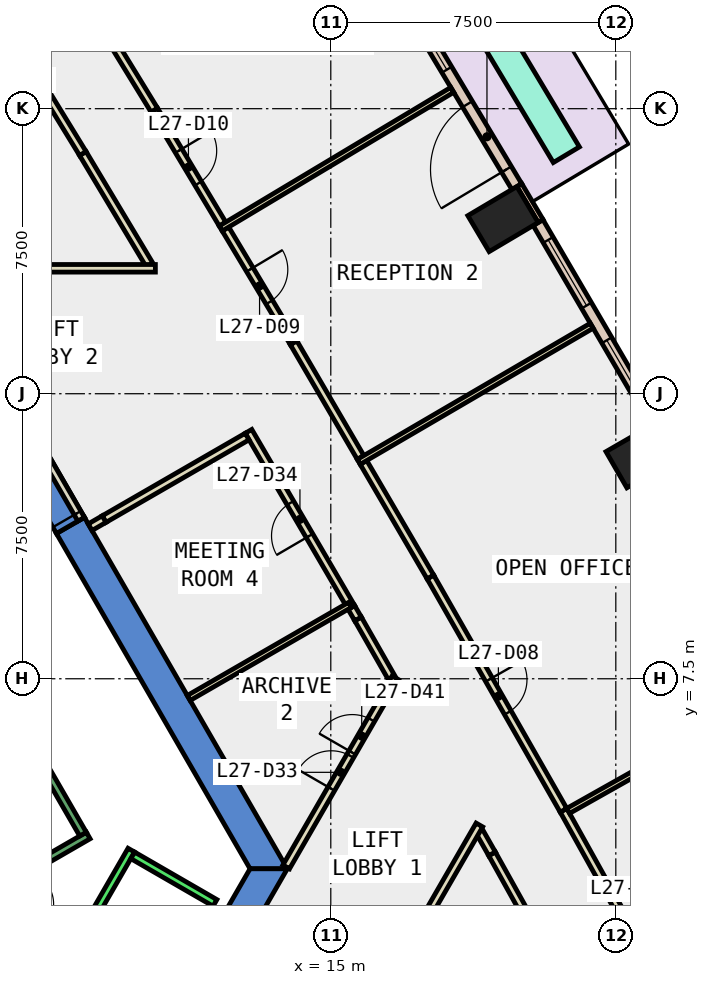
"""IFC4 building model, lengths in metres.
Left out: names, types, materials, properties, quantities, classifications, styles, units other than length and angle.
Written with IfcOpenShell. Run it as: python <this file> out.ifc"""

import sys

from ifc_helpers import new_model, si_unit, direction, frame, frame_2d, origin, origin_2d, place, context, subcontext, project, spatial, polyline, rectangle, outline, extrude, element, fill, save


model = new_model("IFC4")
c1 = context("Model", 3, precision=1e-05, world=origin(), true_north=direction((0.0, 1.0)))
c2 = subcontext(c1, "Body", "Model", "MODEL_VIEW")
j1 = project(units=[si_unit("LENGTHUNIT", "METRE"), si_unit("PLANEANGLEUNIT", "RADIAN")], contexts=[c1])
p1 = place(None, origin())
s1 = spatial("IfcSite", under=j1, at=p1, CompositionType="ELEMENT")
p2 = place(p1, origin())
s2 = spatial("IfcBuilding", under=s1, at=p2, CompositionType="ELEMENT")
p3 = place(p2, frame((0.0, 0.0, 124.4)))
s3 = spatial("IfcBuildingStorey", under=s2, at=p3, CompositionType="ELEMENT", Elevation=124.4)
for number, where, z_axis, x_axis in (
    (1, (23.166, 13.375, -0.4), (0.0, 0.0, 1.0), (-0.5, 0.866, 0.0)),
    (2, (19.532, 19.595, -0.4), (0.0, 0.0, 1.0), (-0.51, 0.86, 0.0)),
):
    element("IfcColumn", number, at=place(p3, frame(where, z_axis=z_axis, x_axis=x_axis)), inside=s3, PredefinedType="COLUMN", context=c2, shape_type="SweptSolid", body=[
        extrude(rectangle(XDim=1.1, YDim=1.5, at=origin_2d()), origin(), (0.0, 0.0, 1.0), 4.2),
    ])
p4 = place(p3, frame((0.0, 0.0, -0.4)))
e3 = element("IfcWall", 3, at=p4, inside=s3, PredefinedType="SHEAR", context=c2, shape_type="SweptSolid", body=[
    extrude(outline(polyline([(8.517, 11.748), (7.781, 11.323), (12.875, 2.5), (13.856, 2.5), (8.517, 11.748)])), origin(), (0.0, 0.0, 1.0), 4.2),
])
p5 = place(p3, frame((0.0, 0.0, 3.6)))
e4 = element("IfcWall", 4, at=p5, inside=s3, PredefinedType="SHEAR", context=c2, shape_type="SweptSolid", body=[
    extrude(outline(polyline([(7.517, 13.48), (6.781, 13.055), (7.781, 11.323), (8.517, 11.748), (7.517, 13.48)])), origin(), (0.0, 0.0, 1.0), 0.2),
])
p6 = place(p3, frame((0.0, 0.0, -0.4)))
e5 = element("IfcWall", 5, at=p6, inside=s3, PredefinedType="SHEAR", context=c2, shape_type="SweptSolid", body=[
    extrude(outline(polyline([(11.931, 0.865), (12.667, 0.44), (13.856, 2.5), (12.875, 2.5), (11.931, 0.865)])), origin(), (0.0, 0.0, 1.0), 4.2),
])
p7 = place(p3, frame((20.522, 19.543, 0.0), z_axis=(0.0, 0.0, 1.0), x_axis=(-0.510082245696, 0.860125631885, 0.0)))
e6 = element("IfcWall", 6, at=p7, inside=s3, PredefinedType="STANDARD", context=c2, shape_type="SweptSolid", body=[
    extrude(rectangle(XDim=1.1, YDim=0.15, at=frame_2d((0.55, 0.0))), origin(), (0.0, 0.0, 1.0), 3.8),
])
p8 = place(p3, frame((23.538, 14.224, 0.0), z_axis=(0.0, 0.0, 1.0), x_axis=(-0.504441987427, 0.863445586775, 0.0)))
e7 = element("IfcWall", 7, at=p8, inside=s3, PredefinedType="STANDARD", context=c2, shape_type="SweptSolid", body=[
    extrude(rectangle(XDim=6.114, YDim=0.3, at=frame_2d((3.057, 0.0))), origin(), (0.0, 0.0, 1.0), 3.8),
])
p9 = place(p8, frame((0.528, 0.0, 0.9)))
e8 = element("IfcOpeningElement", 8, at=p9, cuts=e7, PredefinedType="OPENING", context=c2, shape_type="SweptSolid", body=[
    extrude(rectangle(XDim=2.0, YDim=2.6, at=frame_2d((1.0, 1.3))), frame((0.0, 0.16, 0.0), z_axis=(0.0, -1.0, 0.0), x_axis=(1.0, 0.0, 0.0)), (0.0, 0.0, 1.0), 0.32),
])
p10 = place(p8, frame((3.585, 0.0, 0.9)))
e9 = element("IfcOpeningElement", 9, at=p10, cuts=e7, PredefinedType="OPENING", context=c2, shape_type="SweptSolid", body=[
    extrude(rectangle(XDim=2.0, YDim=2.6, at=frame_2d((1.0, 1.3))), frame((0.0, 0.16, 0.0), z_axis=(0.0, -1.0, 0.0), x_axis=(1.0, 0.0, 0.0)), (0.0, 0.0, 1.0), 0.32),
])
p11 = place(p3, frame((19.895, 20.449, 0.0), z_axis=(0.0, 0.0, 1.0), x_axis=(-0.513708729904, 0.857964650099, 0.0)))
e10 = element("IfcWall", 10, at=p11, inside=s3, PredefinedType="STANDARD", context=c2, shape_type="SweptSolid", body=[
    extrude(rectangle(XDim=6.115, YDim=0.3, at=frame_2d((3.057, 0.0))), origin(), (0.0, 0.0, 1.0), 3.8),
])
p12 = place(p11, frame((0.529, 0.0, 0.0)))
e11 = element("IfcOpeningElement", 11, at=p12, cuts=e10, PredefinedType="OPENING", context=c2, shape_type="SweptSolid", body=[
    extrude(rectangle(XDim=2.0, YDim=2.4, at=frame_2d((1.0, 1.2))), frame((0.0, 0.16, 0.0), z_axis=(0.0, -1.0, 0.0), x_axis=(1.0, 0.0, 0.0)), (0.0, 0.0, 1.0), 0.32),
])
p13 = place(p11, frame((3.586, 0.0, 0.9)))
e12 = element("IfcOpeningElement", 12, at=p13, cuts=e10, PredefinedType="OPENING", context=c2, shape_type="SweptSolid", body=[
    extrude(rectangle(XDim=2.0, YDim=2.6, at=frame_2d((1.0, 1.3))), frame((0.0, 0.16, 0.0), z_axis=(0.0, -1.0, 0.0), x_axis=(1.0, 0.0, 0.0)), (0.0, 0.0, 1.0), 0.32),
])
p14 = place(p3, frame((21.199, 21.288, 0.0), z_axis=(0.0, 0.0, 1.0), x_axis=(-0.513779237715, 0.857922429415, 0.0)))
e13 = element("IfcWall", 13, at=p14, inside=s3, PredefinedType="STANDARD", context=c2, shape_type="SweptSolid", body=[
    extrude(rectangle(XDim=6.014, YDim=0.8, at=frame_2d((3.007, 0.0))), origin(), (0.0, 0.0, 1.0), 0.8),
])
p15 = place(p3, frame((16.601, 7.526, 0.0), z_axis=(0.0, 0.0, 1.0), x_axis=(-0.495652400286, 0.868520983103, 0.0)))
e14 = element("IfcWall", 14, at=p15, inside=s3, PredefinedType="PARTITIONING", context=c2, shape_type="SweptSolid", body=[
    extrude(rectangle(XDim=1.784, YDim=0.2, at=frame_2d((0.892, 0.0))), origin(), (0.0, 0.0, 1.0), 3.8),
])
p16 = place(p3, frame((15.717, 9.075, 0.0), z_axis=(0.0, 0.0, 1.0), x_axis=(-0.50235401398, 0.864662040706, 0.0)))
e15 = element("IfcWall", 15, at=p16, inside=s3, PredefinedType="PARTITIONING", context=c2, shape_type="SweptSolid", body=[
    extrude(rectangle(XDim=0.35, YDim=0.2, at=frame_2d((0.175, 0.0))), origin(), (0.0, 0.0, 1.0), 3.8),
])
p17 = place(p3, frame((15.541, 9.378, 0.0), z_axis=(0.0, 0.0, 1.0), x_axis=(-0.504428354193, 0.863453551435, 0.0)))
e16 = element("IfcWall", 16, at=p17, inside=s3, PredefinedType="PARTITIONING", context=c2, shape_type="SweptSolid", body=[
    extrude(rectangle(XDim=5.365, YDim=0.2, at=frame_2d((2.682, 0.0))), origin(), (0.0, 0.0, 1.0), 3.8),
])
p18 = place(p17, frame((2.182, 0.0, 0.0)))
e17 = element("IfcOpeningElement", 17, at=p18, cuts=e16, PredefinedType="OPENING", context=c2, shape_type="SweptSolid", body=[
    extrude(rectangle(XDim=1.0, YDim=2.1, at=frame_2d((0.5, 1.05))), frame((0.0, 0.11, 0.0), z_axis=(0.0, -1.0, 0.0), x_axis=(1.0, 0.0, 0.0)), (0.0, 0.0, 1.0), 0.22),
])
p19 = place(p3, frame((12.798, 13.873, 0.0), z_axis=(0.0, 0.0, 1.0), x_axis=(-0.866080799279, -0.499904039911, 0.0)))
e18 = element("IfcWall", 18, at=p19, inside=s3, PredefinedType="PARTITIONING", context=c2, shape_type="SweptSolid", body=[
    extrude(rectangle(XDim=4.345, YDim=0.2, at=frame_2d((2.172, 0.0))), origin(), (0.0, 0.0, 1.0), 3.8),
])
p20 = place(p3, frame((10.232, 18.386, 0.0), z_axis=(0.0, 0.0, 1.0), x_axis=(-0.513592824646, 0.858034038062, 0.0)))
e19 = element("IfcWall", 19, at=p20, inside=s3, PredefinedType="PARTITIONING", context=c2, shape_type="SweptSolid", body=[
    extrude(rectangle(XDim=3.421, YDim=0.2, at=frame_2d((1.71, 0.0))), origin(), (0.0, 0.0, 1.0), 3.8),
])
p21 = place(p3, frame((8.475, 21.321, 0.0), z_axis=(0.0, 0.0, 1.0), x_axis=(-0.522743103274, 0.852490262689, 0.0)))
e20 = element("IfcWall", 20, at=p21, inside=s3, PredefinedType="PARTITIONING", context=c2, shape_type="SweptSolid", body=[
    extrude(rectangle(XDim=7.115, YDim=0.2, at=frame_2d((3.557, 0.0))), origin(), (0.0, 0.0, 1.0), 3.8),
])
p22 = place(p21, frame((3.057, 0.0, 0.0)))
e21 = element("IfcOpeningElement", 21, at=p22, cuts=e20, PredefinedType="OPENING", context=c2, shape_type="SweptSolid", body=[
    extrude(rectangle(XDim=1.0, YDim=2.1, at=frame_2d((0.5, 1.05))), frame((0.0, 0.11, 0.0), z_axis=(0.0, -1.0, 0.0), x_axis=(1.0, 0.0, 0.0)), (0.0, 0.0, 1.0), 0.22),
])
p23 = place(p3, frame((22.702, -3.321, 0.0), z_axis=(0.0, 0.0, 1.0), x_axis=(-0.486304341235, 0.873789498504, 0.0)))
e22 = element("IfcWall", 22, at=p23, inside=s3, PredefinedType="PARTITIONING", context=c2, shape_type="SweptSolid", body=[
    extrude(rectangle(XDim=7.113, YDim=0.2, at=frame_2d((3.556, 0.0))), origin(), (0.0, 0.0, 1.0), 3.8),
])
p24 = place(p23, frame((3.057, 0.0, 0.0)))
e23 = element("IfcOpeningElement", 23, at=p24, cuts=e22, PredefinedType="OPENING", context=c2, shape_type="SweptSolid", body=[
    extrude(rectangle(XDim=1.0, YDim=2.1, at=frame_2d((0.5, 1.05))), frame((0.0, 0.11, 0.0), z_axis=(0.0, -1.0, 0.0), x_axis=(1.0, 0.0, 0.0)), (0.0, 0.0, 1.0), 0.22),
])
p25 = place(p3, frame((19.243, 2.894, 0.0), z_axis=(0.0, 0.0, 1.0), x_axis=(-0.494108984218, 0.869399972231, 0.0)))
e24 = element("IfcWall", 24, at=p25, inside=s3, PredefinedType="PARTITIONING", context=c2, shape_type="SweptSolid", body=[
    extrude(rectangle(XDim=0.674, YDim=0.2, at=frame_2d((0.337, 0.0))), origin(), (0.0, 0.0, 1.0), 3.8),
])
p26 = place(p3, frame((21.124, 4.04, 0.0), z_axis=(0.0, 0.0, 1.0), x_axis=(0.486229558972, -0.873831114107, 0.0)))
e25 = element("IfcWall", 25, at=p26, inside=s3, PredefinedType="PARTITIONING", context=c2, shape_type="SweptSolid", body=[
    extrude(rectangle(XDim=7.136, YDim=0.2, at=frame_2d((3.568, 0.0))), origin(), (0.0, 0.0, 1.0), 3.8),
])
p27 = place(p26, frame((3.143, 0.0, 0.0)))
e26 = element("IfcOpeningElement", 26, at=p27, cuts=e25, PredefinedType="OPENING", context=c2, shape_type="SweptSolid", body=[
    extrude(rectangle(XDim=1.0, YDim=2.1, at=frame_2d((0.5, 1.05))), frame((0.0, 0.11, 0.0), z_axis=(0.0, -1.0, 0.0), x_axis=(1.0, 0.0, 0.0)), (0.0, 0.0, 1.0), 0.22),
])
p28 = place(p3, frame((15.86, 13.193, 0.0), z_axis=(0.0, 0.0, 1.0), x_axis=(0.504383407959, -0.863479807393, 0.0)))
e27 = element("IfcWall", 27, at=p28, inside=s3, PredefinedType="PARTITIONING", context=c2, shape_type="SweptSolid", body=[
    extrude(rectangle(XDim=3.495, YDim=0.2, at=frame_2d((1.748, 0.0))), origin(), (0.0, 0.0, 1.0), 3.8),
])
p29 = place(p3, frame((17.623, 10.175, 0.0), z_axis=(0.0, 0.0, 1.0), x_axis=(0.4954688358, -0.868625714995, 0.0)))
e28 = element("IfcWall", 28, at=p29, inside=s3, PredefinedType="PARTITIONING", context=c2, shape_type="SweptSolid", body=[
    extrude(rectangle(XDim=7.064, YDim=0.2, at=frame_2d((3.532, 0.0))), origin(), (0.0, 0.0, 1.0), 3.8),
])
p30 = place(p29, frame((3.107, 0.0, 0.0)))
e29 = element("IfcOpeningElement", 29, at=p30, cuts=e28, PredefinedType="OPENING", context=c2, shape_type="SweptSolid", body=[
    extrude(rectangle(XDim=1.0, YDim=2.1, at=frame_2d((0.5, 1.05))), frame((0.0, 0.11, 0.0), z_axis=(0.0, -1.0, 0.0), x_axis=(1.0, 0.0, 0.0)), (0.0, 0.0, 1.0), 0.22),
])
p31 = place(p3, frame((12.228, 19.335, 0.0), z_axis=(0.0, 0.0, 1.0), x_axis=(0.513796731551, -0.857911952736, 0.0)))
e30 = element("IfcWall", 30, at=p31, inside=s3, PredefinedType="PARTITIONING", context=c2, shape_type="SweptSolid", body=[
    extrude(rectangle(XDim=3.493, YDim=0.2, at=frame_2d((1.747, 0.0))), origin(), (0.0, 0.0, 1.0), 3.8),
])
p32 = place(p31, frame((1.247, 0.0, 0.0)))
e31 = element("IfcOpeningElement", 31, at=p32, cuts=e30, PredefinedType="OPENING", context=c2, shape_type="SweptSolid", body=[
    extrude(rectangle(XDim=1.0, YDim=2.1, at=frame_2d((0.5, 1.05))), frame((0.0, 0.11, 0.0), z_axis=(0.0, -1.0, 0.0), x_axis=(1.0, 0.0, 0.0)), (0.0, 0.0, 1.0), 0.22),
])
p33 = place(p3, frame((14.023, 16.338, 0.0), z_axis=(0.0, 0.0, 1.0), x_axis=(0.50424043703, -0.863563304954, 0.0)))
e32 = element("IfcWall", 32, at=p33, inside=s3, PredefinedType="PARTITIONING", context=c2, shape_type="SweptSolid", body=[
    extrude(rectangle(XDim=3.492, YDim=0.2, at=frame_2d((1.746, 0.0))), origin(), (0.0, 0.0, 1.0), 3.8),
])
p34 = place(p3, frame((8.531, 25.439, 0.0), z_axis=(0.0, 0.0, 1.0), x_axis=(0.522704631836, -0.852513852003, 0.0)))
e33 = element("IfcWall", 33, at=p34, inside=s3, PredefinedType="PARTITIONING", context=c2, shape_type="SweptSolid", body=[
    extrude(rectangle(XDim=3.493, YDim=0.2, at=frame_2d((1.747, 0.0))), origin(), (0.0, 0.0, 1.0), 3.8),
])
p35 = place(p3, frame((10.357, 22.461, 0.0), z_axis=(0.0, 0.0, 1.0), x_axis=(0.513467759888, -0.858108885606, 0.0)))
e34 = element("IfcWall", 34, at=p35, inside=s3, PredefinedType="PARTITIONING", context=c2, shape_type="SweptSolid", body=[
    extrude(rectangle(XDim=3.494, YDim=0.2, at=frame_2d((1.747, 0.0))), origin(), (0.0, 0.0, 1.0), 3.8),
])
p36 = place(p35, frame((1.247, 0.0, 0.0)))
e35 = element("IfcOpeningElement", 35, at=p36, cuts=e34, PredefinedType="OPENING", context=c2, shape_type="SweptSolid", body=[
    extrude(rectangle(XDim=1.0, YDim=2.1, at=frame_2d((0.5, 1.05))), frame((0.0, 0.11, 0.0), z_axis=(0.0, -1.0, 0.0), x_axis=(1.0, 0.0, 0.0)), (0.0, 0.0, 1.0), 0.22),
])
p37 = place(p3, frame((6.25, 1.894, 0.0), z_axis=(0.0, 0.0, 1.0), x_axis=(0.866043184279, -0.499969202016, 0.0)))
e36 = element("IfcWall", 36, at=p37, inside=s3, PredefinedType="PARTITIONING", context=c2, shape_type="SweptSolid", body=[
    extrude(rectangle(XDim=2.084, YDim=0.2, at=frame_2d((1.042, 0.0))), origin(), (0.0, 0.0, 1.0), 3.8),
])
p38 = place(p37, frame((0.642, 0.0, 0.0)))
e37 = element("IfcOpeningElement", 37, at=p38, cuts=e36, PredefinedType="OPENING", context=c2, shape_type="SweptSolid", body=[
    extrude(rectangle(XDim=0.9, YDim=2.1, at=frame_2d((0.45, 1.05))), frame((0.0, 0.11, 0.0), z_axis=(0.0, -1.0, 0.0), x_axis=(1.0, 0.0, 0.0)), (0.0, 0.0, 1.0), 0.22),
])
p39 = place(p3, frame((11.261, 6.994, 0.0), z_axis=(0.0, 0.0, 1.0), x_axis=(0.866013769041, 0.500020151426, 0.0)))
e38 = element("IfcWall", 38, at=p39, inside=s3, PredefinedType="PARTITIONING", context=c2, shape_type="SweptSolid", body=[
    extrude(rectangle(XDim=4.898, YDim=0.15, at=frame_2d((2.449, 0.0))), origin(), (0.0, 0.0, 1.0), 3.8),
])
p40 = place(p3, frame((13.827, 2.55, 0.0), z_axis=(0.0, 0.0, 1.0), x_axis=(0.500032637853, 0.866006559491, 0.0)))
e39 = element("IfcWall", 39, at=p40, inside=s3, PredefinedType="PARTITIONING", context=c2, shape_type="SweptSolid", body=[
    extrude(rectangle(XDim=5.746, YDim=0.2, at=frame_2d((2.873, 0.0))), origin(), (0.0, 0.0, 1.0), 3.8),
])
p41 = place(p40, frame((2.373, 0.0, 0.0)))
e40 = element("IfcOpeningElement", 40, at=p41, cuts=e39, PredefinedType="OPENING", context=c2, shape_type="SweptSolid", body=[
    extrude(rectangle(XDim=1.0, YDim=2.1, at=frame_2d((0.5, 1.05))), frame((0.0, 0.11, 0.0), z_axis=(0.0, -1.0, 0.0), x_axis=(1.0, 0.0, 0.0)), (0.0, 0.0, 1.0), 0.22),
])
p42 = place(p40, frame((3.473, 0.0, 0.0)))
e41 = element("IfcOpeningElement", 41, at=p42, cuts=e39, PredefinedType="OPENING", context=c2, shape_type="SweptSolid", body=[
    extrude(rectangle(XDim=1.0, YDim=2.1, at=frame_2d((0.5, 1.05))), frame((0.0, 0.11, 0.0), z_axis=(0.0, -1.0, 0.0), x_axis=(1.0, 0.0, 0.0)), (0.0, 0.0, 1.0), 0.22),
])
p43 = place(p3, frame((0.4, 18.3, 0.0), z_axis=(0.0, 0.0, 1.0), x_axis=(1.0, 0.0, 0.0)))
e42 = element("IfcWall", 42, at=p43, inside=s3, PredefinedType="PARTITIONING", context=c2, shape_type="SweptSolid", body=[
    extrude(rectangle(XDim=9.984, YDim=0.2, at=frame_2d((4.992, 0.0))), origin(), (0.0, 0.0, 1.0), 3.8),
])
p44 = place(p3, frame((18.91, 3.653, 0.0), z_axis=(0.0, 0.0, 1.0), x_axis=(-0.500052967229, -0.865994820981, 0.0)))
e43 = element("IfcWall", 43, at=p44, inside=s3, PredefinedType="PARTITIONING", context=c2, shape_type="SweptSolid", body=[
    extrude(rectangle(XDim=5.179, YDim=0.2, at=frame_2d((2.59, 0.0))), origin(), (0.0, 0.0, 1.0), 3.8),
])
p45 = place(p3, frame((21.247, 4.024, 0.0), z_axis=(0.0, 0.0, 1.0), x_axis=(0.871261721438, 0.490818716795, 0.0)))
e44 = element("IfcWall", 44, at=p45, inside=s3, PredefinedType="PARTITIONING", context=c2, shape_type="SweptSolid", body=[
    extrude(rectangle(XDim=5.53, YDim=0.15, at=frame_2d((2.765, 0.0))), origin(), (0.0, 0.0, 1.0), 3.8),
])
p46 = place(p3, frame((15.736, 13.207, 0.0), z_axis=(0.0, 0.0, 1.0), x_axis=(0.863454426155, 0.504426856892, 0.0)))
e45 = element("IfcWall", 45, at=p46, inside=s3, PredefinedType="PARTITIONING", context=c2, shape_type="SweptSolid", body=[
    extrude(rectangle(XDim=7.099, YDim=0.15, at=frame_2d((3.55, 0.0))), origin(), (0.0, 0.0, 1.0), 3.8),
])
p47 = place(p3, frame((12.104, 19.348, 0.0), z_axis=(0.0, 0.0, 1.0), x_axis=(0.85799008499, 0.513666247732, 0.0)))
e46 = element("IfcWall", 46, at=p47, inside=s3, PredefinedType="PARTITIONING", context=c2, shape_type="SweptSolid", body=[
    extrude(rectangle(XDim=7.1, YDim=0.15, at=frame_2d((3.55, 0.0))), origin(), (0.0, 0.0, 1.0), 3.8),
])
p48 = place(p3, frame((8.43, 11.698, 0.0), z_axis=(0.0, 0.0, 1.0), x_axis=(-0.50002537861, 0.866010750942, 0.0)))
e47 = element("IfcWall", 47, at=p48, inside=s3, PredefinedType="PARTITIONING", context=c2, shape_type="SweptSolid", body=[
    extrude(rectangle(XDim=2.0, YDim=0.2, at=frame_2d((1.0, 0.0))), origin(), (0.0, 0.0, 1.0), 2.4),
])
p49 = place(p48, frame((0.19, 0.0, 0.0)))
e48 = element("IfcOpeningElement", 48, at=p49, cuts=e47, PredefinedType="OPENING", context=c2, shape_type="SweptSolid", body=[
    extrude(rectangle(XDim=1.8, YDim=2.1, at=frame_2d((0.9, 1.05))), frame((0.0, 0.11, 0.0), z_axis=(0.0, -1.0, 0.0), x_axis=(1.0, 0.0, 0.0)), (0.0, 0.0, 1.0), 0.22),
])
p50 = place(p3, frame((9.035, 11.701, 0.0), z_axis=(0.0, 0.0, 1.0), x_axis=(-0.865544229481, -0.500832493767, 0.0)))
e49 = element("IfcWall", 49, at=p50, inside=s3, PredefinedType="PARTITIONING", context=c2, shape_type="SweptSolid", body=[
    extrude(rectangle(XDim=0.425, YDim=0.2, at=frame_2d((0.212, 0.0))), origin(), (0.0, 0.0, 1.0), 2.4),
])
p51 = place(p3, frame((4.451, -6.19, 0.0), z_axis=(0.0, 0.0, 1.0), x_axis=(0.50000090737, 0.866024879913, 0.0)))
e50 = element("IfcWall", 50, at=p51, inside=s3, PredefinedType="STANDARD", context=c2, shape_type="SweptSolid", body=[
    extrude(rectangle(XDim=10.6, YDim=0.2, at=frame_2d((5.3, 0.0))), origin(), (0.0, 0.0, 1.0), 3.8),
])
p52 = place(p3, frame((9.788, 2.853, 0.0), z_axis=(0.0, 0.0, 1.0), x_axis=(0.865998541277, -0.500046524342, 0.0)))
e51 = element("IfcWall", 51, at=p52, inside=s3, PredefinedType="STANDARD", context=c2, shape_type="SweptSolid", body=[
    extrude(rectangle(XDim=2.5, YDim=0.2, at=frame_2d((1.25, 0.0))), origin(), (0.0, 0.0, 1.0), 3.8),
])
p53 = place(p3, frame((4.806, 1.176, 0.0), z_axis=(0.0, 0.0, 1.0), x_axis=(0.866059941101, 0.499940174841, 0.0)))
e52 = element("IfcWall", 52, at=p53, inside=s3, PredefinedType="STANDARD", context=c2, shape_type="SweptSolid", body=[
    extrude(rectangle(XDim=4.4, YDim=0.2, at=frame_2d((2.2, 0.0))), origin(), (0.0, 0.0, 1.0), 3.8),
])
p54 = place(p53, frame((1.65, 0.0, 0.0)))
e53 = element("IfcOpeningElement", 53, at=p54, cuts=e52, PredefinedType="OPENING", context=c2, shape_type="SweptSolid", body=[
    extrude(rectangle(XDim=1.1, YDim=2.2, at=frame_2d((0.55, 1.1))), frame((0.0, 0.11, 0.0), z_axis=(0.0, -1.0, 0.0), x_axis=(1.0, 0.0, 0.0)), (0.0, 0.0, 1.0), 0.22),
])
p55 = place(p3, frame((8.48, 3.412, 0.0), z_axis=(0.0, 0.0, 1.0), x_axis=(-0.499978703459, 0.866037698999, 0.0)))
e54 = element("IfcWall", 54, at=p55, inside=s3, PredefinedType="STANDARD", context=c2, shape_type="SweptSolid", body=[
    extrude(rectangle(XDim=6.9, YDim=0.2, at=frame_2d((3.45, 0.0))), origin(), (0.0, 0.0, 1.0), 3.8),
])
p56 = place(p9, origin())
e55 = element("IfcWindow", 55, at=p56, inside=s3, PartitioningType="SINGLE_PANEL", PredefinedType="WINDOW", context=c2, shape_type="SweptSolid", body=[
    extrude(rectangle(XDim=2.0, YDim=2.6, at=frame_2d((1.0, 1.3))), frame((0.0, 0.03, 0.0), z_axis=(0.0, -1.0, 0.0), x_axis=(1.0, 0.0, 0.0)), (0.0, 0.0, 1.0), 0.06),
])
fill(e8, e55)
p57 = place(p10, origin())
e56 = element("IfcWindow", 56, at=p57, inside=s3, PartitioningType="SINGLE_PANEL", PredefinedType="WINDOW", context=c2, shape_type="SweptSolid", body=[
    extrude(rectangle(XDim=2.0, YDim=2.6, at=frame_2d((1.0, 1.3))), frame((0.0, 0.03, 0.0), z_axis=(0.0, -1.0, 0.0), x_axis=(1.0, 0.0, 0.0)), (0.0, 0.0, 1.0), 0.06),
])
fill(e9, e56)
p58 = place(p12, origin())
e57 = element("IfcDoor", 57, at=p58, inside=s3, OperationType="SLIDING_TO_LEFT", PredefinedType="DOOR", context=c2, shape_type="SweptSolid", body=[
    extrude(rectangle(XDim=2.0, YDim=2.4, at=frame_2d((1.0, 1.2))), frame((0.0, 0.025, 0.0), z_axis=(0.0, -1.0, 0.0), x_axis=(1.0, 0.0, 0.0)), (0.0, 0.0, 1.0), 0.05),
])
fill(e11, e57)
p59 = place(p13, origin())
e58 = element("IfcWindow", 58, at=p59, inside=s3, PartitioningType="SINGLE_PANEL", PredefinedType="WINDOW", context=c2, shape_type="SweptSolid", body=[
    extrude(rectangle(XDim=2.0, YDim=2.6, at=frame_2d((1.0, 1.3))), frame((0.0, 0.03, 0.0), z_axis=(0.0, -1.0, 0.0), x_axis=(1.0, 0.0, 0.0)), (0.0, 0.0, 1.0), 0.06),
])
fill(e12, e58)
p60 = place(p30, origin())
e59 = element("IfcDoor", 59, at=p60, inside=s3, OperationType="SINGLE_SWING_LEFT", PredefinedType="DOOR", context=c2, shape_type="SweptSolid", body=[
    extrude(rectangle(XDim=1.0, YDim=2.1, at=frame_2d((0.5, 1.05))), frame((0.0, 0.025, 0.0), z_axis=(0.0, -1.0, 0.0), x_axis=(1.0, 0.0, 0.0)), (0.0, 0.0, 1.0), 0.05),
])
fill(e29, e59)
p61 = place(p32, origin())
e60 = element("IfcDoor", 60, at=p61, inside=s3, OperationType="SINGLE_SWING_LEFT", PredefinedType="DOOR", context=c2, shape_type="SweptSolid", body=[
    extrude(rectangle(XDim=1.0, YDim=2.1, at=frame_2d((0.5, 1.05))), frame((0.0, 0.025, 0.0), z_axis=(0.0, -1.0, 0.0), x_axis=(1.0, 0.0, 0.0)), (0.0, 0.0, 1.0), 0.05),
])
fill(e31, e60)
p62 = place(p36, origin())
e61 = element("IfcDoor", 61, at=p62, inside=s3, OperationType="SINGLE_SWING_RIGHT", PredefinedType="DOOR", context=c2, shape_type="SweptSolid", body=[
    extrude(rectangle(XDim=1.0, YDim=2.1, at=frame_2d((0.5, 1.05))), frame((0.0, 0.025, 0.0), z_axis=(0.0, -1.0, 0.0), x_axis=(1.0, 0.0, 0.0)), (0.0, 0.0, 1.0), 0.05),
])
fill(e35, e61)
p63 = place(p41, origin())
e62 = element("IfcDoor", 62, at=p63, inside=s3, OperationType="SINGLE_SWING_LEFT", PredefinedType="DOOR", context=c2, shape_type="SweptSolid", body=[
    extrude(rectangle(XDim=1.0, YDim=2.1, at=frame_2d((0.5, 1.05))), frame((0.0, 0.025, 0.0), z_axis=(0.0, -1.0, 0.0), x_axis=(1.0, 0.0, 0.0)), (0.0, 0.0, 1.0), 0.05),
])
fill(e40, e62)
p64 = place(p18, origin())
e63 = element("IfcDoor", 63, at=p64, inside=s3, OperationType="SINGLE_SWING_LEFT", PredefinedType="DOOR", context=c2, shape_type="SweptSolid", body=[
    extrude(rectangle(XDim=1.0, YDim=2.1, at=frame_2d((0.5, 1.05))), frame((0.0, 0.025, 0.0), z_axis=(0.0, -1.0, 0.0), x_axis=(1.0, 0.0, 0.0)), (0.0, 0.0, 1.0), 0.05),
])
fill(e17, e63)
p65 = place(p42, origin())
e64 = element("IfcDoor", 64, at=p65, inside=s3, OperationType="SINGLE_SWING_RIGHT", PredefinedType="DOOR", context=c2, shape_type="SweptSolid", body=[
    extrude(rectangle(XDim=1.0, YDim=2.1, at=frame_2d((0.5, 1.05))), frame((0.0, 0.025, 0.0), z_axis=(0.0, -1.0, 0.0), x_axis=(1.0, 0.0, 0.0)), (0.0, 0.0, 1.0), 0.05),
])
fill(e41, e64)
p66 = place(p49, origin())
e65 = element("IfcDoor", 65, at=p66, inside=s3, OperationType="DOUBLE_DOOR_SINGLE_SWING", PredefinedType="DOOR", context=c2, shape_type="SweptSolid", body=[
    extrude(rectangle(XDim=1.8, YDim=2.1, at=frame_2d((0.9, 1.05))), frame((0.0, 0.025, 0.0), z_axis=(0.0, -1.0, 0.0), x_axis=(1.0, 0.0, 0.0)), (0.0, 0.0, 1.0), 0.05),
])
fill(e48, e65)
save(model, sys.argv[1])
